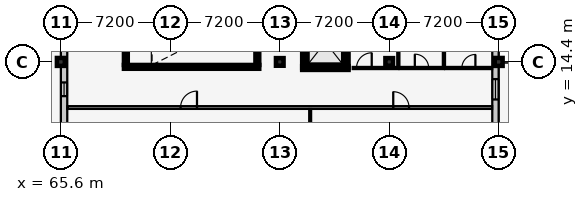
"""IFC4 building model, lengths in metres.
Left out: names, types, materials, properties, quantities, classifications, styles, units other than length and angle.
Written with IfcOpenShell. Run it as: python <this file> out.ifc"""

import sys

from ifc_helpers import new_model, si_unit, direction, frame, frame_2d, origin, origin_2d, place, context, subcontext, project, spatial, rectangle, extrude, element, fill, save


model = new_model("IFC4")
c1 = context("Model", 3, precision=1e-05, world=origin(), true_north=direction((0.0, 1.0)))
c2 = subcontext(c1, "Body", "Model", "MODEL_VIEW")
j1 = project(units=[si_unit("LENGTHUNIT", "METRE"), si_unit("PLANEANGLEUNIT", "RADIAN")], contexts=[c1])
p1 = place(None, origin())
s1 = spatial("IfcSite", under=j1, at=p1, CompositionType="ELEMENT")
p2 = place(p1, origin())
s2 = spatial("IfcBuilding", under=s1, at=p2, CompositionType="ELEMENT")
p3 = place(p2, frame((0.0, 0.0, 18.0)))
s3 = spatial("IfcBuildingStorey", under=s2, at=p3, CompositionType="ELEMENT", Elevation=18.0)
p4 = place(p3, frame((65.6, 14.4, 0.0), z_axis=(0.0, 0.0, 1.0), x_axis=(1.0, 0.0, 0.0)))
e1 = element("IfcColumn", 1, at=p4, inside=s3, PredefinedType="COLUMN", context=c2, shape_type="SweptSolid", body=[
    extrude(rectangle(XDim=0.52, YDim=0.52, at=origin_2d()), origin(), (0.0, 0.0, 1.0), 3.9),
])
for number, where, z_axis, x_axis in (
    (2, (80.0, 14.4, 0.0), (0.0, 0.0, 1.0), (1.0, 0.0, 0.0)),
    (3, (87.2, 14.4, 0.0), (0.0, 0.0, 1.0), (1.0, 0.0, 0.0)),
):
    element("IfcColumn", number, at=place(p3, frame(where, z_axis=z_axis, x_axis=x_axis)), inside=s3, PredefinedType="COLUMN", context=c2, shape_type="SweptSolid", body=[
        extrude(rectangle(XDim=0.5, YDim=0.5, at=origin_2d()), origin(), (0.0, 0.0, 1.0), 3.9),
    ])
p5 = place(p3, frame((94.4, 14.4, 0.0), z_axis=(0.0, 0.0, 1.0), x_axis=(1.0, 0.0, 0.0)))
e4 = element("IfcColumn", 4, at=p5, inside=s3, PredefinedType="COLUMN", context=c2, shape_type="SweptSolid", body=[
    extrude(rectangle(XDim=0.52, YDim=0.52, at=origin_2d()), origin(), (0.0, 0.0, 1.0), 3.9),
])
p6 = place(p3, frame((94.19, 21.6, 0.0), z_axis=(0.0, 0.0, 1.0), x_axis=(0.0, -1.0, 0.0)))
e5 = element("IfcWall", 5, at=p6, inside=s3, PredefinedType="SOLIDWALL", context=c2, shape_type="SweptSolid", body=[
    extrude(rectangle(XDim=21.6, YDim=0.42, at=frame_2d((10.8, 0.0))), origin(), (0.0, 0.0, 1.0), 3.055),
])
p7 = place(p6, frame((15.8, 0.0, 0.0)))
e6 = element("IfcOpeningElement", 6, at=p7, cuts=e5, PredefinedType="OPENING", context=c2, shape_type="SweptSolid", body=[
    extrude(rectangle(XDim=1.6, YDim=2.2, at=frame_2d((0.8, 1.1))), frame((0.0, 0.222, 0.0), z_axis=(0.0, -1.0, 0.0), x_axis=(1.0, 0.0, 0.0)), (0.0, 0.0, 1.0), 0.444),
])
p8 = place(p6, frame((1.24, 0.0, 0.9)))
e7 = element("IfcOpeningElement", 7, at=p8, cuts=e5, PredefinedType="OPENING", context=c2, shape_type="SweptSolid", body=[
    extrude(rectangle(XDim=1.12, YDim=1.75, at=frame_2d((0.56, 0.875))), frame((0.0, 0.222, 0.0), z_axis=(0.0, -1.0, 0.0), x_axis=(1.0, 0.0, 0.0)), (0.0, 0.0, 1.0), 0.444),
])
p9 = place(p6, frame((4.78, 0.0, 0.9)))
e8 = element("IfcOpeningElement", 8, at=p9, cuts=e5, PredefinedType="OPENING", context=c2, shape_type="SweptSolid", body=[
    extrude(rectangle(XDim=1.24, YDim=1.75, at=frame_2d((0.62, 0.875))), frame((0.0, 0.222, 0.0), z_axis=(0.0, -1.0, 0.0), x_axis=(1.0, 0.0, 0.0)), (0.0, 0.0, 1.0), 0.444),
])
p10 = place(p6, frame((8.33, 0.0, 0.9)))
e9 = element("IfcOpeningElement", 9, at=p10, cuts=e5, PredefinedType="OPENING", context=c2, shape_type="SweptSolid", body=[
    extrude(rectangle(XDim=1.34, YDim=1.75, at=frame_2d((0.67, 0.875))), frame((0.0, 0.222, 0.0), z_axis=(0.0, -1.0, 0.0), x_axis=(1.0, 0.0, 0.0)), (0.0, 0.0, 1.0), 0.444),
])
p11 = place(p6, frame((11.88, 0.0, 0.9)))
e10 = element("IfcOpeningElement", 10, at=p11, cuts=e5, PredefinedType="OPENING", context=c2, shape_type="SweptSolid", body=[
    extrude(rectangle(XDim=1.44, YDim=1.75, at=frame_2d((0.72, 0.875))), frame((0.0, 0.222, 0.0), z_axis=(0.0, -1.0, 0.0), x_axis=(1.0, 0.0, 0.0)), (0.0, 0.0, 1.0), 0.444),
])
p12 = place(p6, frame((19.35, 0.0, 0.9)))
e11 = element("IfcOpeningElement", 11, at=p12, cuts=e5, PredefinedType="OPENING", context=c2, shape_type="SweptSolid", body=[
    extrude(rectangle(XDim=0.9, YDim=1.35, at=frame_2d((0.45, 0.675))), frame((0.0, 0.222, 0.0), z_axis=(0.0, -1.0, 0.0), x_axis=(1.0, 0.0, 0.0)), (0.0, 0.0, 1.0), 0.444),
])
p13 = place(p3, frame((65.81, 0.0, 0.0), z_axis=(0.0, 0.0, 1.0), x_axis=(0.0, 1.0, 0.0)))
e12 = element("IfcWall", 12, at=p13, inside=s3, PredefinedType="SOLIDWALL", context=c2, shape_type="SweptSolid", body=[
    extrude(rectangle(XDim=21.6, YDim=0.42, at=frame_2d((10.8, 0.0))), origin(), (0.0, 0.0, 1.0), 3.055),
])
p14 = place(p13, frame((1.175, 0.0, 0.9)))
e13 = element("IfcOpeningElement", 13, at=p14, cuts=e12, PredefinedType="OPENING", context=c2, shape_type="SweptSolid", body=[
    extrude(rectangle(XDim=1.25, YDim=1.45, at=frame_2d((0.625, 0.725))), frame((0.0, 0.222, 0.0), z_axis=(0.0, -1.0, 0.0), x_axis=(1.0, 0.0, 0.0)), (0.0, 0.0, 1.0), 0.444),
])
p15 = place(p13, frame((4.725, 0.0, 0.9)))
e14 = element("IfcOpeningElement", 14, at=p15, cuts=e12, PredefinedType="OPENING", context=c2, shape_type="SweptSolid", body=[
    extrude(rectangle(XDim=1.35, YDim=1.45, at=frame_2d((0.675, 0.725))), frame((0.0, 0.222, 0.0), z_axis=(0.0, -1.0, 0.0), x_axis=(1.0, 0.0, 0.0)), (0.0, 0.0, 1.0), 0.444),
])
p16 = place(p13, frame((8.275, 0.0, 0.9)))
e15 = element("IfcOpeningElement", 15, at=p16, cuts=e12, PredefinedType="OPENING", context=c2, shape_type="SweptSolid", body=[
    extrude(rectangle(XDim=1.45, YDim=1.45, at=frame_2d((0.725, 0.725))), frame((0.0, 0.222, 0.0), z_axis=(0.0, -1.0, 0.0), x_axis=(1.0, 0.0, 0.0)), (0.0, 0.0, 1.0), 0.444),
])
p17 = place(p13, frame((12.15, 0.0, 0.9)))
e16 = element("IfcOpeningElement", 16, at=p17, cuts=e12, PredefinedType="OPENING", context=c2, shape_type="SweptSolid", body=[
    extrude(rectangle(XDim=0.9, YDim=1.6, at=frame_2d((0.45, 0.8))), frame((0.0, 0.222, 0.0), z_axis=(0.0, -1.0, 0.0), x_axis=(1.0, 0.0, 0.0)), (0.0, 0.0, 1.0), 0.444),
])
p18 = place(p13, frame((15.675, 0.0, 0.9)))
e17 = element("IfcOpeningElement", 17, at=p18, cuts=e12, PredefinedType="OPENING", context=c2, shape_type="SweptSolid", body=[
    extrude(rectangle(XDim=1.05, YDim=1.6, at=frame_2d((0.525, 0.8))), frame((0.0, 0.222, 0.0), z_axis=(0.0, -1.0, 0.0), x_axis=(1.0, 0.0, 0.0)), (0.0, 0.0, 1.0), 0.444),
])
p19 = place(p13, frame((19.225, 0.0, 0.9)))
e18 = element("IfcOpeningElement", 18, at=p19, cuts=e12, PredefinedType="OPENING", context=c2, shape_type="SweptSolid", body=[
    extrude(rectangle(XDim=1.15, YDim=1.6, at=frame_2d((0.575, 0.8))), frame((0.0, 0.222, 0.0), z_axis=(0.0, -1.0, 0.0), x_axis=(1.0, 0.0, 0.0)), (0.0, 0.0, 1.0), 0.444),
])
p20 = place(p3, frame((69.75, 14.075, 0.0), z_axis=(0.0, 0.0, 1.0), x_axis=(1.0, 0.0, 0.0)))
e19 = element("IfcWall", 19, at=p20, inside=s3, PredefinedType="SHEAR", context=c2, shape_type="SweptSolid", body=[
    extrude(rectangle(XDim=8.9, YDim=0.25, at=frame_2d((4.45, 0.0))), origin(), (0.0, 0.0, 1.0), 3.66),
])
p21 = place(p3, frame((69.875, 17.65, 0.0), z_axis=(0.0, 0.0, 1.0), x_axis=(0.0, -1.0, 0.0)))
e20 = element("IfcWall", 20, at=p21, inside=s3, PredefinedType="SHEAR", context=c2, shape_type="SweptSolid", body=[
    extrude(rectangle(XDim=3.45, YDim=0.25, at=frame_2d((1.725, 0.0))), origin(), (0.0, 0.0, 1.0), 3.66),
])
p22 = place(p21, frame((1.15, 0.0, 0.0)))
e21 = element("IfcOpeningElement", 21, at=p22, cuts=e20, PredefinedType="OPENING", context=c2, shape_type="SweptSolid", body=[
    extrude(rectangle(XDim=1.15, YDim=2.15, at=frame_2d((0.575, 1.075))), frame((0.0, 0.137, 0.0), z_axis=(0.0, -1.0, 0.0), x_axis=(1.0, 0.0, 0.0)), (0.0, 0.0, 1.0), 0.274),
])
p23 = place(p3, frame((78.525, 14.2, 0.0), z_axis=(0.0, 0.0, 1.0), x_axis=(0.0, 1.0, 0.0)))
e22 = element("IfcWall", 22, at=p23, inside=s3, PredefinedType="SHEAR", context=c2, shape_type="SweptSolid", body=[
    extrude(rectangle(XDim=3.45, YDim=0.25, at=frame_2d((1.725, 0.0))), origin(), (0.0, 0.0, 1.0), 3.66),
])
p24 = place(p3, frame((81.475, 14.0, 0.0), z_axis=(0.0, 0.0, 1.0), x_axis=(1.0, 0.0, 0.0)))
e23 = element("IfcWall", 23, at=p24, inside=s3, PredefinedType="SHEAR", context=c2, shape_type="SweptSolid", body=[
    extrude(rectangle(XDim=3.05, YDim=0.25, at=frame_2d((1.525, 0.0))), origin(), (0.0, 0.0, 1.0), 3.66),
])
p25 = place(p24, frame((0.725, 0.0, 0.0)))
e24 = element("IfcOpeningElement", 24, at=p25, cuts=e23, PredefinedType="OPENING", context=c2, shape_type="SweptSolid", body=[
    extrude(rectangle(XDim=1.6, YDim=2.3, at=frame_2d((0.8, 1.15))), frame((0.0, 0.137, 0.0), z_axis=(0.0, -1.0, 0.0), x_axis=(1.0, 0.0, 0.0)), (0.0, 0.0, 1.0), 0.274),
])
for number, where, z_axis, x_axis in (
    (25, (81.6, 17.4, 0.0), (0.0, 0.0, 1.0), (0.0, -1.0, 0.0)),
    (26, (84.4, 14.0, 0.0), (0.0, 0.0, 1.0), (0.0, 1.0, 0.0)),
):
    element("IfcWall", number, at=place(p3, frame(where, z_axis=z_axis, x_axis=x_axis)), inside=s3, PredefinedType="SHEAR", context=c2, shape_type="SweptSolid", body=[
        extrude(rectangle(XDim=3.4, YDim=0.25, at=frame_2d((1.7, 0.0))), origin(), (0.0, 0.0, 1.0), 3.66),
    ])
p26 = place(p3, frame((66.03, 11.4, 0.0), z_axis=(0.0, 0.0, 1.0), x_axis=(1.0, 0.0, 0.0)))
e27 = element("IfcWall", 27, at=p26, inside=s3, PredefinedType="PARTITIONING", context=c2, shape_type="SweptSolid", body=[
    extrude(rectangle(XDim=27.94, YDim=0.18, at=frame_2d((13.97, 0.0))), origin(), (0.0, 0.0, 1.0), 3.66),
])
p27 = place(p26, frame((7.445, 0.0, 0.0)))
e28 = element("IfcOpeningElement", 28, at=p27, cuts=e27, PredefinedType="OPENING", context=c2, shape_type="SweptSolid", body=[
    extrude(rectangle(XDim=1.08, YDim=2.15, at=frame_2d((0.54, 1.075))), frame((0.0, 0.102, 0.0), z_axis=(0.0, -1.0, 0.0), x_axis=(1.0, 0.0, 0.0)), (0.0, 0.0, 1.0), 0.204),
])
p28 = place(p26, frame((21.435, 0.0, 0.0)))
e29 = element("IfcOpeningElement", 29, at=p28, cuts=e27, PredefinedType="OPENING", context=c2, shape_type="SweptSolid", body=[
    extrude(rectangle(XDim=1.04, YDim=2.15, at=frame_2d((0.52, 1.075))), frame((0.0, 0.102, 0.0), z_axis=(0.0, -1.0, 0.0), x_axis=(1.0, 0.0, 0.0)), (0.0, 0.0, 1.0), 0.204),
])
p29 = place(p3, frame((82.0, 0.43, 0.0), z_axis=(0.0, 0.0, 1.0), x_axis=(0.0, 1.0, 0.0)))
e30 = element("IfcWall", 30, at=p29, inside=s3, PredefinedType="PARTITIONING", context=c2, shape_type="SweptSolid", body=[
    extrude(rectangle(XDim=10.87, YDim=0.125, at=frame_2d((5.435, 0.0))), origin(), (0.0, 0.0, 1.0), 3.66),
])
p30 = place(p3, frame((84.8, 14.0, 0.0), z_axis=(0.0, 0.0, 1.0), x_axis=(1.0, 0.0, 0.0)))
e31 = element("IfcWall", 31, at=p30, inside=s3, PredefinedType="PARTITIONING", context=c2, shape_type="SweptSolid", body=[
    extrude(rectangle(XDim=3.0, YDim=0.14, at=frame_2d((1.5, 0.0))), origin(), (0.0, 0.0, 1.0), 3.66),
])
p31 = place(p30, frame((0.25, 0.0, 0.0)))
e32 = element("IfcOpeningElement", 32, at=p31, cuts=e31, PredefinedType="OPENING", context=c2, shape_type="SweptSolid", body=[
    extrude(rectangle(XDim=1.0, YDim=2.1, at=frame_2d((0.5, 1.05))), frame((0.0, 0.082, 0.0), z_axis=(0.0, -1.0, 0.0), x_axis=(1.0, 0.0, 0.0)), (0.0, 0.0, 1.0), 0.164),
])
p32 = place(p3, frame((87.8, 14.08, 0.0), z_axis=(0.0, 0.0, 1.0), x_axis=(0.0, 1.0, 0.0)))
e33 = element("IfcWall", 33, at=p32, inside=s3, PredefinedType="PARTITIONING", context=c2, shape_type="SweptSolid", body=[
    extrude(rectangle(XDim=7.09, YDim=0.14, at=frame_2d((3.545, 0.0))), origin(), (0.0, 0.0, 1.0), 3.66),
])
p33 = place(p3, frame((87.88, 14.0, 0.0), z_axis=(0.0, 0.0, 1.0), x_axis=(1.0, 0.0, 0.0)))
e34 = element("IfcWall", 34, at=p33, inside=s3, PredefinedType="PARTITIONING", context=c2, shape_type="SweptSolid", body=[
    extrude(rectangle(XDim=2.92, YDim=0.14, at=frame_2d((1.46, 0.0))), origin(), (0.0, 0.0, 1.0), 3.66),
])
p34 = place(p33, frame((1.005, 0.0, 0.0)))
e35 = element("IfcOpeningElement", 35, at=p34, cuts=e34, PredefinedType="OPENING", context=c2, shape_type="SweptSolid", body=[
    extrude(rectangle(XDim=0.91, YDim=2.06, at=frame_2d((0.455, 1.03))), frame((0.0, 0.082, 0.0), z_axis=(0.0, -1.0, 0.0), x_axis=(1.0, 0.0, 0.0)), (0.0, 0.0, 1.0), 0.164),
])
p35 = place(p3, frame((90.8, 14.08, 0.0), z_axis=(0.0, 0.0, 1.0), x_axis=(0.0, 1.0, 0.0)))
e36 = element("IfcWall", 36, at=p35, inside=s3, PredefinedType="PARTITIONING", context=c2, shape_type="SweptSolid", body=[
    extrude(rectangle(XDim=7.09, YDim=0.14, at=frame_2d((3.545, 0.0))), origin(), (0.0, 0.0, 1.0), 3.275),
])
p36 = place(p3, frame((90.88, 14.0, 0.0), z_axis=(0.0, 0.0, 1.0), x_axis=(1.0, 0.0, 0.0)))
e37 = element("IfcWall", 37, at=p36, inside=s3, PredefinedType="PARTITIONING", context=c2, shape_type="SweptSolid", body=[
    extrude(rectangle(XDim=3.09, YDim=0.14, at=frame_2d((1.545, 0.0))), origin(), (0.0, 0.0, 1.0), 3.66),
])
p37 = place(p36, frame((1.1, 0.0, 0.0)))
e38 = element("IfcOpeningElement", 38, at=p37, cuts=e37, PredefinedType="OPENING", context=c2, shape_type="SweptSolid", body=[
    extrude(rectangle(XDim=0.89, YDim=2.05, at=frame_2d((0.445, 1.025))), frame((0.0, 0.082, 0.0), z_axis=(0.0, -1.0, 0.0), x_axis=(1.0, 0.0, 0.0)), (0.0, 0.0, 1.0), 0.164),
])
p38 = place(p10, origin())
e39 = element("IfcWindow", 39, at=p38, inside=s3, PartitioningType="SINGLE_PANEL", PredefinedType="WINDOW", context=c2, shape_type="SweptSolid", body=[
    extrude(rectangle(XDim=1.34, YDim=1.75, at=frame_2d((0.67, 0.875))), frame((0.0, 0.03, 0.0), z_axis=(0.0, -1.0, 0.0), x_axis=(1.0, 0.0, 0.0)), (0.0, 0.0, 1.0), 0.06),
])
fill(e9, e39)
p39 = place(p17, origin())
e40 = element("IfcWindow", 40, at=p39, inside=s3, PartitioningType="SINGLE_PANEL", PredefinedType="WINDOW", context=c2, shape_type="SweptSolid", body=[
    extrude(rectangle(XDim=0.9, YDim=1.6, at=frame_2d((0.45, 0.8))), frame((0.0, 0.03, 0.0), z_axis=(0.0, -1.0, 0.0), x_axis=(1.0, 0.0, 0.0)), (0.0, 0.0, 1.0), 0.06),
])
fill(e16, e40)
p40 = place(p25, origin())
e41 = element("IfcDoor", 41, at=p40, inside=s3, OperationType="DOUBLE_DOOR_SLIDING", PredefinedType="DOOR", context=c2, shape_type="SweptSolid", body=[
    extrude(rectangle(XDim=1.6, YDim=2.3, at=frame_2d((0.8, 1.15))), frame((0.0, 0.025, 0.0), z_axis=(0.0, -1.0, 0.0), x_axis=(1.0, 0.0, 0.0)), (0.0, 0.0, 1.0), 0.05),
])
fill(e24, e41)
p41 = place(p27, origin())
e42 = element("IfcDoor", 42, at=p41, inside=s3, OperationType="SINGLE_SWING_RIGHT", PredefinedType="DOOR", context=c2, shape_type="SweptSolid", body=[
    extrude(rectangle(XDim=1.08, YDim=2.15, at=frame_2d((0.54, 1.075))), frame((0.0, 0.025, 0.0), z_axis=(0.0, -1.0, 0.0), x_axis=(1.0, 0.0, 0.0)), (0.0, 0.0, 1.0), 0.05),
])
fill(e28, e42)
p42 = place(p28, origin())
e43 = element("IfcDoor", 43, at=p42, inside=s3, OperationType="SINGLE_SWING_LEFT", PredefinedType="DOOR", context=c2, shape_type="SweptSolid", body=[
    extrude(rectangle(XDim=1.04, YDim=2.15, at=frame_2d((0.52, 1.075))), frame((0.0, 0.025, 0.0), z_axis=(0.0, -1.0, 0.0), x_axis=(1.0, 0.0, 0.0)), (0.0, 0.0, 1.0), 0.05),
])
fill(e29, e43)
p43 = place(p31, origin())
e44 = element("IfcDoor", 44, at=p43, inside=s3, OperationType="SINGLE_SWING_RIGHT", PredefinedType="DOOR", context=c2, shape_type="SweptSolid", body=[
    extrude(rectangle(XDim=1.0, YDim=2.1, at=frame_2d((0.5, 1.05))), frame((0.0, 0.025, 0.0), z_axis=(0.0, -1.0, 0.0), x_axis=(1.0, 0.0, 0.0)), (0.0, 0.0, 1.0), 0.05),
])
fill(e32, e44)
p44 = place(p34, origin())
e45 = element("IfcDoor", 45, at=p44, inside=s3, OperationType="SINGLE_SWING_LEFT", PredefinedType="DOOR", context=c2, shape_type="SweptSolid", body=[
    extrude(rectangle(XDim=0.91, YDim=2.06, at=frame_2d((0.455, 1.03))), frame((0.0, 0.025, 0.0), z_axis=(0.0, -1.0, 0.0), x_axis=(1.0, 0.0, 0.0)), (0.0, 0.0, 1.0), 0.05),
])
fill(e35, e45)
p45 = place(p37, origin())
e46 = element("IfcDoor", 46, at=p45, inside=s3, OperationType="SINGLE_SWING_RIGHT", PredefinedType="DOOR", context=c2, shape_type="SweptSolid", body=[
    extrude(rectangle(XDim=0.89, YDim=2.05, at=frame_2d((0.445, 1.025))), frame((0.0, 0.025, 0.0), z_axis=(0.0, -1.0, 0.0), x_axis=(1.0, 0.0, 0.0)), (0.0, 0.0, 1.0), 0.05),
])
fill(e38, e46)
save(model, sys.argv[1])
